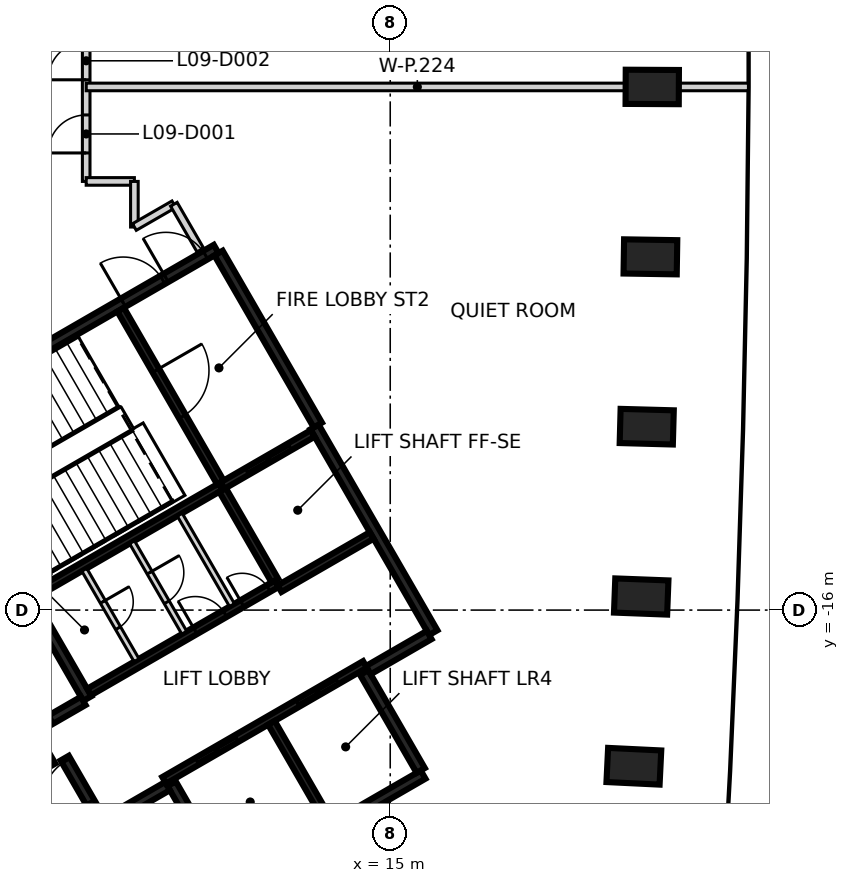
"""IFC4 building model, lengths in metres.
Left out: names, types, materials, properties, quantities, classifications, styles, units other than length and angle.
Written with IfcOpenShell. Run it as: python <this file> out.ifc"""

import sys

from ifc_helpers import new_model, si_unit, direction, frame, frame_2d, origin, origin_2d, place, context, subcontext, project, spatial, rectangle, extrude, element, fill, save


model = new_model("IFC4")
c1 = context("Model", 3, precision=1e-05, world=origin(), true_north=direction((0.0, 1.0)))
c2 = subcontext(c1, "Body", "Model", "MODEL_VIEW")
j1 = project(units=[si_unit("LENGTHUNIT", "METRE"), si_unit("PLANEANGLEUNIT", "RADIAN")], contexts=[c1])
p1 = place(None, origin())
s1 = spatial("IfcSite", under=j1, at=p1, CompositionType="ELEMENT")
p2 = place(p1, origin())
s2 = spatial("IfcBuilding", under=s1, at=p2, CompositionType="ELEMENT")
p3 = place(p2, frame((0.0, 0.0, 45.8)))
s3 = spatial("IfcBuildingStorey", under=s2, at=p3, CompositionType="ELEMENT", Elevation=45.8)
for number, where, z_axis, x_axis in (
    (1, (21.41, -20.109, -0.475), (0.0, 0.0, 1.0), (-0.999, 0.048, 0.0)),
    (2, (21.604, -15.643, -0.475), (0.0, 0.0, 1.0), (-0.999, 0.038, 0.0)),
    (3, (21.749, -11.174, -0.475), (0.0, 0.0, 1.0), (-1.0, 0.027, 0.0)),
    (4, (21.846, -6.706, -0.475), (0.0, 0.0, 1.0), (-1.0, 0.016, 0.0)),
    (5, (21.894, -2.235, -0.475), (0.0, 0.0, 1.0), (-1.0, 0.005, 0.0)),
):
    element("IfcColumn", number, at=place(p3, frame(where, z_axis=z_axis, x_axis=x_axis)), inside=s3, PredefinedType="COLUMN", context=c2, shape_type="SweptSolid", body=[
        extrude(rectangle(XDim=1.4, YDim=0.9, at=origin_2d()), origin(), (0.0, 0.0, 1.0), 3.6),
    ])
p4 = place(p3, frame((0.417, -12.273, 0.0), z_axis=(0.0, 0.0, 1.0), x_axis=(0.866021906294, 0.500006057782, 0.0)))
e6 = element("IfcWall", 6, at=p4, inside=s3, PredefinedType="SHEAR", context=c2, shape_type="SweptSolid", body=[
    extrude(rectangle(XDim=11.55, YDim=0.25, at=frame_2d((5.775, 0.0))), origin(), (0.0, 0.0, 1.0), 3.125),
])
p5 = place(p4, frame((10.025, 0.0, 0.0)))
e7 = element("IfcOpeningElement", 7, at=p5, cuts=e6, PredefinedType="OPENING", context=c2, shape_type="SweptSolid", body=[
    extrude(rectangle(XDim=1.2, YDim=2.1, at=frame_2d((0.6, 1.05))), frame((0.0, 0.135, 0.0), z_axis=(0.0, -1.0, 0.0), x_axis=(1.0, 0.0, 0.0)), (0.0, 0.0, 1.0), 0.27),
])
p6 = place(p4, frame((8.725, 0.0, 0.0)))
e8 = element("IfcOpeningElement", 8, at=p6, cuts=e6, PredefinedType="OPENING", context=c2, shape_type="SweptSolid", body=[
    extrude(rectangle(XDim=1.2, YDim=2.1, at=frame_2d((0.6, 1.05))), frame((0.0, 0.135, 0.0), z_axis=(0.0, -1.0, 0.0), x_axis=(1.0, 0.0, 0.0)), (0.0, 0.0, 1.0), 0.27),
])
p7 = place(p3, frame((13.008, -11.181, 0.0), z_axis=(0.0, 0.0, 1.0), x_axis=(0.500004234368, -0.866022959057, 0.0)))
e9 = element("IfcWall", 9, at=p7, inside=s3, PredefinedType="SHEAR", context=c2, shape_type="SweptSolid", body=[
    extrude(rectangle(XDim=6.25, YDim=0.25, at=frame_2d((3.125, 0.0))), origin(), (0.0, 0.0, 1.0), 3.125),
])
p8 = place(p3, frame((15.865, -20.328, 0.0), z_axis=(0.0, 0.0, 1.0), x_axis=(-0.86602852612, -0.499994591916, 0.0)))
e10 = element("IfcWall", 10, at=p8, inside=s3, PredefinedType="SHEAR", context=c2, shape_type="SweptSolid", body=[
    extrude(rectangle(XDim=5.85, YDim=0.25, at=frame_2d((2.925, 0.0))), origin(), (0.0, 0.0, 1.0), 3.125),
])
p9 = place(p3, frame((10.483, -6.606, 0.0), z_axis=(0.0, 0.0, 1.0), x_axis=(0.49999885962, -0.866026062182, 0.0)))
e11 = element("IfcWall", 11, at=p9, inside=s3, PredefinedType="SHEAR", context=c2, shape_type="SweptSolid", body=[
    extrude(rectangle(XDim=5.225, YDim=0.25, at=frame_2d((2.612, 0.0))), origin(), (0.0, 0.0, 1.0), 3.125),
])
p10 = place(p3, frame((7.031, -18.327, 0.0), z_axis=(0.0, 0.0, 1.0), x_axis=(-0.499971222258, 0.866042017984, 0.0)))
e12 = element("IfcWall", 12, at=p10, inside=s3, PredefinedType="SHEAR", context=c2, shape_type="SweptSolid", body=[
    extrude(rectangle(XDim=3.2, YDim=0.25, at=frame_2d((1.6, 0.0))), origin(), (0.0, 0.0, 1.0), 3.125),
])
for number, where, z_axis, x_axis in (
    (13, (14.315, -17.644, 0.0), (0.0, 0.0, 1.0), (0.5, -0.866, 0.0)),
    (14, (10.736, -23.145, 0.0), (0.0, 0.0, 1.0), (-0.5, 0.866, 0.0)),
):
    element("IfcWall", number, at=place(p3, frame(where, z_axis=z_axis, x_axis=x_axis)), inside=s3, PredefinedType="SHEAR", context=c2, shape_type="SweptSolid", body=[
        extrude(rectangle(XDim=2.974, YDim=0.25, at=frame_2d((1.487, 0.0))), origin(), (0.0, 0.0, 1.0), 3.125),
    ])
p11 = place(p3, frame((9.14, -20.631, 0.0), z_axis=(0.0, 0.0, 1.0), x_axis=(-0.866043531843, -0.499968599967, 0.0)))
e15 = element("IfcWall", 15, at=p11, inside=s3, PredefinedType="SHEAR", context=c2, shape_type="SweptSolid", body=[
    extrude(rectangle(XDim=1.975, YDim=0.25, at=frame_2d((0.987, 0.0))), origin(), (0.0, 0.0, 1.0), 3.125),
])
p12 = place(p3, frame((16.025, -16.656, 0.0), z_axis=(0.0, 0.0, 1.0), x_axis=(-0.866016279763, -0.500015802937, 0.0)))
e16 = element("IfcWall", 16, at=p12, inside=s3, PredefinedType="SHEAR", context=c2, shape_type="SweptSolid", body=[
    extrude(rectangle(XDim=1.849, YDim=0.25, at=frame_2d((0.925, 0.0))), origin(), (0.0, 0.0, 1.0), 3.125),
])
p13 = place(p3, frame((7.367, -21.51, 0.0), z_axis=(0.0, 0.0, 1.0), x_axis=(-0.499983108224, 0.866035156036, 0.0)))
e17 = element("IfcWall", 17, at=p13, inside=s3, PredefinedType="SHEAR", context=c2, shape_type="SweptSolid", body=[
    extrude(rectangle(XDim=1.865, YDim=0.25, at=frame_2d((0.932, 0.0))), origin(), (0.0, 0.0, 1.0), 3.125),
])
p14 = place(p13, frame((0.535, 0.0, 0.0)))
e18 = element("IfcOpeningElement", 18, at=p14, cuts=e17, PredefinedType="OPENING", context=c2, shape_type="SweptSolid", body=[
    extrude(rectangle(XDim=1.25, YDim=2.1, at=frame_2d((0.625, 1.05))), frame((0.0, 0.135, 0.0), z_axis=(0.0, -1.0, 0.0), x_axis=(1.0, 0.0, 0.0)), (0.0, 0.0, 1.0), 0.27),
])
p15 = place(p3, frame((6.065, -18.885, 0.0), z_axis=(0.0, 0.0, 1.0), x_axis=(0.866017078145, 0.500014420154, 0.0)))
e19 = element("IfcWall", 19, at=p15, inside=s3, PredefinedType="SHEAR", context=c2, shape_type="SweptSolid", body=[
    extrude(rectangle(XDim=0.989, YDim=0.25, at=frame_2d((0.495, 0.0))), origin(), (0.0, 0.0, 1.0), 3.125),
])
p16 = place(p3, frame((6.08, -20.1, 0.0), z_axis=(0.0, 0.0, 1.0), x_axis=(-0.500051773299, 0.865995510393, 0.0)))
e20 = element("IfcWall", 20, at=p16, inside=s3, PredefinedType="SHEAR", context=c2, shape_type="SweptSolid", body=[
    extrude(rectangle(XDim=0.685, YDim=0.25, at=frame_2d((0.342, 0.0))), origin(), (0.0, 0.0, 1.0), 3.125),
])
p17 = place(p3, frame((9.052, -20.48, 0.0), z_axis=(0.0, 0.0, 1.0), x_axis=(0.866030299012, 0.499991521122, 0.0)))
e21 = element("IfcWall", 21, at=p17, inside=s3, PredefinedType="SHEAR", context=c2, shape_type="SweptSolid", body=[
    extrude(rectangle(XDim=6.1, YDim=0.2, at=frame_2d((3.05, 0.0))), origin(), (0.0, 0.0, 1.0), 3.125),
])
p18 = place(p17, frame((1.0, 0.0, 0.0)))
e22 = element("IfcOpeningElement", 22, at=p18, cuts=e21, PredefinedType="OPENING", context=c2, shape_type="SweptSolid", body=[
    extrude(rectangle(XDim=1.2, YDim=2.1, at=frame_2d((0.6, 1.05))), frame((0.0, 0.11, 0.0), z_axis=(0.0, -1.0, 0.0), x_axis=(1.0, 0.0, 0.0)), (0.0, 0.0, 1.0), 0.22),
])
p19 = place(p17, frame((4.05, 0.0, 0.0)))
e23 = element("IfcOpeningElement", 23, at=p19, cuts=e21, PredefinedType="OPENING", context=c2, shape_type="SweptSolid", body=[
    extrude(rectangle(XDim=1.2, YDim=2.1, at=frame_2d((0.6, 1.05))), frame((0.0, 0.11, 0.0), z_axis=(0.0, -1.0, 0.0), x_axis=(1.0, 0.0, 0.0)), (0.0, 0.0, 1.0), 0.22),
])
p20 = place(p3, frame((10.538, -12.752, 0.0), z_axis=(0.0, 0.0, 1.0), x_axis=(-0.866038630372, -0.499977090179, 0.0)))
e24 = element("IfcWall", 24, at=p20, inside=s3, PredefinedType="SHEAR", context=c2, shape_type="SweptSolid", body=[
    extrude(rectangle(XDim=5.699, YDim=0.2, at=frame_2d((2.85, 0.0))), origin(), (0.0, 0.0, 1.0), 3.125),
])
p21 = place(p3, frame((7.077, -18.156, 0.0), z_axis=(0.0, 0.0, 1.0), x_axis=(0.866038630372, 0.499977090179, 0.0)))
e25 = element("IfcWall", 25, at=p21, inside=s3, PredefinedType="SHEAR", context=c2, shape_type="SweptSolid", body=[
    extrude(rectangle(XDim=5.699, YDim=0.2, at=frame_2d((2.85, 0.0))), origin(), (0.0, 0.0, 1.0), 3.125),
])
p22 = place(p21, frame((3.224, 0.0, 0.0)))
e26 = element("IfcOpeningElement", 26, at=p22, cuts=e25, PredefinedType="OPENING", context=c2, shape_type="SweptSolid", body=[
    extrude(rectangle(XDim=0.9, YDim=2.1, at=frame_2d((0.45, 1.05))), frame((0.0, 0.11, 0.0), z_axis=(0.0, -1.0, 0.0), x_axis=(1.0, 0.0, 0.0)), (0.0, 0.0, 1.0), 0.22),
])
p23 = place(p21, frame((4.649, 0.0, 0.0)))
e27 = element("IfcOpeningElement", 27, at=p23, cuts=e25, PredefinedType="OPENING", context=c2, shape_type="SweptSolid", body=[
    extrude(rectangle(XDim=0.8, YDim=2.1, at=frame_2d((0.4, 1.05))), frame((0.0, 0.11, 0.0), z_axis=(0.0, -1.0, 0.0), x_axis=(1.0, 0.0, 0.0)), (0.0, 0.0, 1.0), 0.22),
])
p24 = place(p3, frame((7.906, -8.094, 0.0), z_axis=(0.0, 0.0, 1.0), x_axis=(0.500024287448, -0.866011380966, 0.0)))
e28 = element("IfcWall", 28, at=p24, inside=s3, PredefinedType="SHEAR", context=c2, shape_type="SweptSolid", body=[
    extrude(rectangle(XDim=5.251, YDim=0.2, at=frame_2d((2.625, 0.0))), origin(), (0.0, 0.0, 1.0), 3.125),
])
p25 = place(p24, frame((1.849, 0.0, 0.0)))
e29 = element("IfcOpeningElement", 29, at=p25, cuts=e28, PredefinedType="OPENING", context=c2, shape_type="SweptSolid", body=[
    extrude(rectangle(XDim=1.4, YDim=2.1, at=frame_2d((0.7, 1.05))), frame((0.0, 0.11, 0.0), z_axis=(0.0, -1.0, 0.0), x_axis=(1.0, 0.0, 0.0)), (0.0, 0.0, 1.0), 0.22),
])
p26 = place(p3, frame((11.875, -18.967, 0.0), z_axis=(0.0, 0.0, 1.0), x_axis=(0.49998131003, -0.866036194175, 0.0)))
e30 = element("IfcWall", 30, at=p26, inside=s3, PredefinedType="SHEAR", context=c2, shape_type="SweptSolid", body=[
    extrude(rectangle(XDim=3.048, YDim=0.2, at=frame_2d((1.524, 0.0))), origin(), (0.0, 0.0, 1.0), 3.125),
])
p27 = place(p3, frame((11.963, -15.22, 0.0), z_axis=(0.0, 0.0, 1.0), x_axis=(-0.500034990121, 0.866005201286, 0.0)))
e31 = element("IfcWall", 31, at=p27, inside=s3, PredefinedType="SHEAR", context=c2, shape_type="SweptSolid", body=[
    extrude(rectangle(XDim=2.75, YDim=0.2, at=frame_2d((1.375, 0.0))), origin(), (0.0, 0.0, 1.0), 3.125),
])
p28 = place(p3, frame((10.587, -12.723, 0.0), z_axis=(0.0, 0.0, 1.0), x_axis=(0.866037306777, 0.499979382845, 0.0)))
e32 = element("IfcWall", 32, at=p28, inside=s3, PredefinedType="SHEAR", context=c2, shape_type="SweptSolid", body=[
    extrude(rectangle(XDim=2.742, YDim=0.2, at=frame_2d((1.371, 0.0))), origin(), (0.0, 0.0, 1.0), 3.125),
])
p29 = place(p28, frame((0.743, 0.0, 0.0)))
e33 = element("IfcOpeningElement", 33, at=p29, cuts=e32, PredefinedType="OPENING", context=c2, shape_type="SweptSolid", body=[
    extrude(rectangle(XDim=1.3, YDim=2.1, at=frame_2d((0.65, 1.05))), frame((0.0, 0.11, 0.0), z_axis=(0.0, -1.0, 0.0), x_axis=(1.0, 0.0, 0.0)), (0.0, 0.0, 1.0), 0.22),
])
p30 = place(p3, frame((14.512, -14.037, 0.0), z_axis=(0.0, 0.0, 1.0), x_axis=(-0.866044696403, -0.499966582715, 0.0)))
e34 = element("IfcWall", 34, at=p30, inside=s3, PredefinedType="SHEAR", context=c2, shape_type="SweptSolid", body=[
    extrude(rectangle(XDim=2.799, YDim=0.2, at=frame_2d((1.399, 0.0))), origin(), (0.0, 0.0, 1.0), 3.125),
])
p31 = place(p3, frame((8.207, -14.214, 0.0), z_axis=(0.0, 0.0, 1.0), x_axis=(0.50002746344, -0.86600954718, 0.0)))
e35 = element("IfcWall", 35, at=p31, inside=s3, PredefinedType="PARTITIONING", context=c2, shape_type="SweptSolid", body=[
    extrude(rectangle(XDim=2.748, YDim=0.15, at=frame_2d((1.374, 0.0))), origin(), (0.0, 0.0, 1.0), 3.125),
])
p32 = place(p31, frame((0.924, 0.0, 0.0)))
e36 = element("IfcOpeningElement", 36, at=p32, cuts=e35, PredefinedType="OPENING", context=c2, shape_type="SweptSolid", body=[
    extrude(rectangle(XDim=0.9, YDim=2.1, at=frame_2d((0.45, 1.05))), frame((0.0, 0.085, 0.0), z_axis=(0.0, -1.0, 0.0), x_axis=(1.0, 0.0, 0.0)), (0.0, 0.0, 1.0), 0.17),
])
p33 = place(p3, frame((9.462, -13.489, 0.0), z_axis=(0.0, 0.0, 1.0), x_axis=(0.499988999718, -0.866031754707, 0.0)))
e37 = element("IfcWall", 37, at=p33, inside=s3, PredefinedType="PARTITIONING", context=c2, shape_type="SweptSolid", body=[
    extrude(rectangle(XDim=2.749, YDim=0.15, at=frame_2d((1.374, 0.0))), origin(), (0.0, 0.0, 1.0), 3.125),
])
p34 = place(p3, frame((6.951, -14.939, 0.0), z_axis=(0.0, 0.0, 1.0), x_axis=(0.499988999718, -0.866031754707, 0.0)))
e38 = element("IfcWall", 38, at=p34, inside=s3, PredefinedType="PARTITIONING", context=c2, shape_type="SweptSolid", body=[
    extrude(rectangle(XDim=2.749, YDim=0.15, at=frame_2d((1.374, 0.0))), origin(), (0.0, 0.0, 1.0), 3.125),
])
p35 = place(p34, frame((0.974, 0.0, 0.0)))
e39 = element("IfcOpeningElement", 39, at=p35, cuts=e38, PredefinedType="OPENING", context=c2, shape_type="SweptSolid", body=[
    extrude(rectangle(XDim=0.8, YDim=2.1, at=frame_2d((0.4, 1.05))), frame((0.0, 0.085, 0.0), z_axis=(0.0, -1.0, 0.0), x_axis=(1.0, 0.0, 0.0)), (0.0, 0.0, 1.0), 0.17),
])
p36 = place(p3, frame((7.0, -4.721, 0.0), z_axis=(0.0, 0.0, 1.0), x_axis=(0.0, 1.0, 0.0)))
e40 = element("IfcWall", 40, at=p36, inside=s3, PredefinedType="PARTITIONING", context=c2, shape_type="SweptSolid", body=[
    extrude(rectangle(XDim=8.799, YDim=0.2, at=frame_2d((4.399, 0.0))), origin(), (0.0, 0.0, 1.0), 3.125),
])
p37 = place(p36, frame((0.749, 0.0, 0.0)))
e41 = element("IfcOpeningElement", 41, at=p37, cuts=e40, PredefinedType="OPENING", context=c2, shape_type="SweptSolid", body=[
    extrude(rectangle(XDim=1.0, YDim=2.1, at=frame_2d((0.5, 1.05))), frame((0.0, 0.11, 0.0), z_axis=(0.0, -1.0, 0.0), x_axis=(1.0, 0.0, 0.0)), (0.0, 0.0, 1.0), 0.22),
])
p38 = place(p36, frame((2.674, 0.0, 0.0)))
e42 = element("IfcOpeningElement", 42, at=p38, cuts=e40, PredefinedType="OPENING", context=c2, shape_type="SweptSolid", body=[
    extrude(rectangle(XDim=1.0, YDim=2.1, at=frame_2d((0.5, 1.05))), frame((0.0, 0.11, 0.0), z_axis=(0.0, -1.0, 0.0), x_axis=(1.0, 0.0, 0.0)), (0.0, 0.0, 1.0), 0.22),
])
p39 = place(p3, frame((7.0, -4.721, 0.0), z_axis=(0.0, 0.0, 1.0), x_axis=(1.0, 0.0, 0.0)))
e43 = element("IfcWall", 43, at=p39, inside=s3, PredefinedType="PARTITIONING", context=c2, shape_type="SweptSolid", body=[
    extrude(rectangle(XDim=1.268, YDim=0.2, at=frame_2d((0.634, 0.0))), origin(), (0.0, 0.0, 1.0), 3.125),
])
p40 = place(p3, frame((8.268, -5.921, 0.0), z_axis=(0.0, 0.0, 1.0), x_axis=(0.0, 1.0, 0.0)))
e44 = element("IfcWall", 44, at=p40, inside=s3, PredefinedType="PARTITIONING", context=c2, shape_type="SweptSolid", body=[
    extrude(rectangle(XDim=1.2, YDim=0.2, at=frame_2d((0.6, 0.0))), origin(), (0.0, 0.0, 1.0), 3.125),
])
p41 = place(p3, frame((8.268, -5.921, 0.0), z_axis=(0.0, 0.0, 1.0), x_axis=(0.866344856625, 0.499446282797, 0.0)))
e45 = element("IfcWall", 45, at=p41, inside=s3, PredefinedType="PARTITIONING", context=c2, shape_type="SweptSolid", body=[
    extrude(rectangle(XDim=1.199, YDim=0.2, at=frame_2d((0.6, 0.0))), origin(), (0.0, 0.0, 1.0), 3.125),
])
p42 = place(p3, frame((9.307, -5.322, 0.0), z_axis=(0.0, 0.0, 1.0), x_axis=(0.500295157811, -0.865854927266, 0.0)))
e46 = element("IfcWall", 46, at=p42, inside=s3, PredefinedType="PARTITIONING", context=c2, shape_type="SweptSolid", body=[
    extrude(rectangle(XDim=1.39, YDim=0.2, at=frame_2d((0.695, 0.0))), origin(), (0.0, 0.0, 1.0), 3.125),
])
p43 = place(p3, frame((7.001, -2.235, 0.0), z_axis=(0.0, 0.0, 1.0), x_axis=(1.0, 0.0, 0.0)))
e47 = element("IfcWall", 47, at=p43, inside=s3, PredefinedType="PARTITIONING", context=c2, shape_type="SweptSolid", body=[
    extrude(rectangle(XDim=17.424, YDim=0.2, at=frame_2d((8.712, 0.0))), origin(), (0.0, 0.0, 1.0), 3.125),
])
p44 = place(p29, origin())
e48 = element("IfcDoor", 48, at=p44, inside=s3, OperationType="SLIDING_TO_LEFT", PredefinedType="DOOR", context=c2, shape_type="SweptSolid", body=[
    extrude(rectangle(XDim=1.3, YDim=2.1, at=frame_2d((0.65, 1.05))), frame((0.0, 0.025, 0.0), z_axis=(0.0, -1.0, 0.0), x_axis=(1.0, 0.0, 0.0)), (0.0, 0.0, 1.0), 0.05),
])
fill(e33, e48)
p45 = place(p18, origin())
e49 = element("IfcDoor", 49, at=p45, inside=s3, OperationType="DOUBLE_DOOR_SLIDING", PredefinedType="DOOR", context=c2, shape_type="SweptSolid", body=[
    extrude(rectangle(XDim=1.2, YDim=2.1, at=frame_2d((0.6, 1.05))), frame((0.0, 0.025, 0.0), z_axis=(0.0, -1.0, 0.0), x_axis=(1.0, 0.0, 0.0)), (0.0, 0.0, 1.0), 0.05),
])
fill(e22, e49)
p46 = place(p19, origin())
e50 = element("IfcDoor", 50, at=p46, inside=s3, OperationType="DOUBLE_DOOR_SLIDING", PredefinedType="DOOR", context=c2, shape_type="SweptSolid", body=[
    extrude(rectangle(XDim=1.2, YDim=2.1, at=frame_2d((0.6, 1.05))), frame((0.0, 0.025, 0.0), z_axis=(0.0, -1.0, 0.0), x_axis=(1.0, 0.0, 0.0)), (0.0, 0.0, 1.0), 0.05),
])
fill(e23, e50)
p47 = place(p14, origin())
e51 = element("IfcDoor", 51, at=p47, inside=s3, OperationType="SINGLE_SWING_LEFT", PredefinedType="DOOR", context=c2, shape_type="SweptSolid", body=[
    extrude(rectangle(XDim=1.25, YDim=2.1, at=frame_2d((0.625, 1.05))), frame((0.0, 0.025, 0.0), z_axis=(0.0, -1.0, 0.0), x_axis=(1.0, 0.0, 0.0)), (0.0, 0.0, 1.0), 0.05),
])
fill(e18, e51)
p48 = place(p5, origin())
e52 = element("IfcDoor", 52, at=p48, inside=s3, OperationType="SINGLE_SWING_LEFT", PredefinedType="DOOR", context=c2, shape_type="SweptSolid", body=[
    extrude(rectangle(XDim=1.2, YDim=2.1, at=frame_2d((0.6, 1.05))), frame((0.0, 0.025, 0.0), z_axis=(0.0, -1.0, 0.0), x_axis=(1.0, 0.0, 0.0)), (0.0, 0.0, 1.0), 0.05),
])
fill(e7, e52)
p49 = place(p6, origin())
e53 = element("IfcDoor", 53, at=p49, inside=s3, OperationType="SINGLE_SWING_RIGHT", PredefinedType="DOOR", context=c2, shape_type="SweptSolid", body=[
    extrude(rectangle(XDim=1.2, YDim=2.1, at=frame_2d((0.6, 1.05))), frame((0.0, 0.025, 0.0), z_axis=(0.0, -1.0, 0.0), x_axis=(1.0, 0.0, 0.0)), (0.0, 0.0, 1.0), 0.05),
])
fill(e8, e53)
p50 = place(p25, origin())
e54 = element("IfcDoor", 54, at=p50, inside=s3, OperationType="SINGLE_SWING_LEFT", PredefinedType="DOOR", context=c2, shape_type="SweptSolid", body=[
    extrude(rectangle(XDim=1.4, YDim=2.1, at=frame_2d((0.7, 1.05))), frame((0.0, 0.025, 0.0), z_axis=(0.0, -1.0, 0.0), x_axis=(1.0, 0.0, 0.0)), (0.0, 0.0, 1.0), 0.05),
])
fill(e29, e54)
p51 = place(p22, origin())
e55 = element("IfcDoor", 55, at=p51, inside=s3, OperationType="SINGLE_SWING_RIGHT", PredefinedType="DOOR", context=c2, shape_type="SweptSolid", body=[
    extrude(rectangle(XDim=0.9, YDim=2.1, at=frame_2d((0.45, 1.05))), frame((0.0, 0.025, 0.0), z_axis=(0.0, -1.0, 0.0), x_axis=(1.0, 0.0, 0.0)), (0.0, 0.0, 1.0), 0.05),
])
fill(e26, e55)
p52 = place(p23, origin())
e56 = element("IfcDoor", 56, at=p52, inside=s3, OperationType="SINGLE_SWING_LEFT", PredefinedType="DOOR", context=c2, shape_type="SweptSolid", body=[
    extrude(rectangle(XDim=0.8, YDim=2.1, at=frame_2d((0.4, 1.05))), frame((0.0, 0.025, 0.0), z_axis=(0.0, -1.0, 0.0), x_axis=(1.0, 0.0, 0.0)), (0.0, 0.0, 1.0), 0.05),
])
fill(e27, e56)
p53 = place(p32, origin())
e57 = element("IfcDoor", 57, at=p53, inside=s3, OperationType="SINGLE_SWING_LEFT", PredefinedType="DOOR", context=c2, shape_type="SweptSolid", body=[
    extrude(rectangle(XDim=0.9, YDim=2.1, at=frame_2d((0.45, 1.05))), frame((0.0, 0.025, 0.0), z_axis=(0.0, -1.0, 0.0), x_axis=(1.0, 0.0, 0.0)), (0.0, 0.0, 1.0), 0.05),
])
fill(e36, e57)
p54 = place(p35, origin())
e58 = element("IfcDoor", 58, at=p54, inside=s3, OperationType="SINGLE_SWING_RIGHT", PredefinedType="DOOR", context=c2, shape_type="SweptSolid", body=[
    extrude(rectangle(XDim=0.8, YDim=2.1, at=frame_2d((0.4, 1.05))), frame((0.0, 0.025, 0.0), z_axis=(0.0, -1.0, 0.0), x_axis=(1.0, 0.0, 0.0)), (0.0, 0.0, 1.0), 0.05),
])
fill(e39, e58)
p55 = place(p37, frame((1.0, 0.0, 0.0), z_axis=(0.0, 0.0, 1.0), x_axis=(-1.0, 0.0, 0.0)))
e59 = element("IfcDoor", 59, at=p55, inside=s3, OperationType="SINGLE_SWING_LEFT", PredefinedType="DOOR", context=c2, shape_type="SweptSolid", body=[
    extrude(rectangle(XDim=1.0, YDim=2.1, at=frame_2d((0.5, 1.05))), frame((0.0, 0.025, 0.0), z_axis=(0.0, -1.0, 0.0), x_axis=(1.0, 0.0, 0.0)), (0.0, 0.0, 1.0), 0.05),
])
fill(e41, e59)
p56 = place(p38, frame((1.0, 0.0, 0.0), z_axis=(0.0, 0.0, 1.0), x_axis=(-1.0, 0.0, 0.0)))
e60 = element("IfcDoor", 60, at=p56, inside=s3, OperationType="SINGLE_SWING_LEFT", PredefinedType="DOOR", context=c2, shape_type="SweptSolid", body=[
    extrude(rectangle(XDim=1.0, YDim=2.1, at=frame_2d((0.5, 1.05))), frame((0.0, 0.025, 0.0), z_axis=(0.0, -1.0, 0.0), x_axis=(1.0, 0.0, 0.0)), (0.0, 0.0, 1.0), 0.05),
])
fill(e42, e60)
save(model, sys.argv[1])
